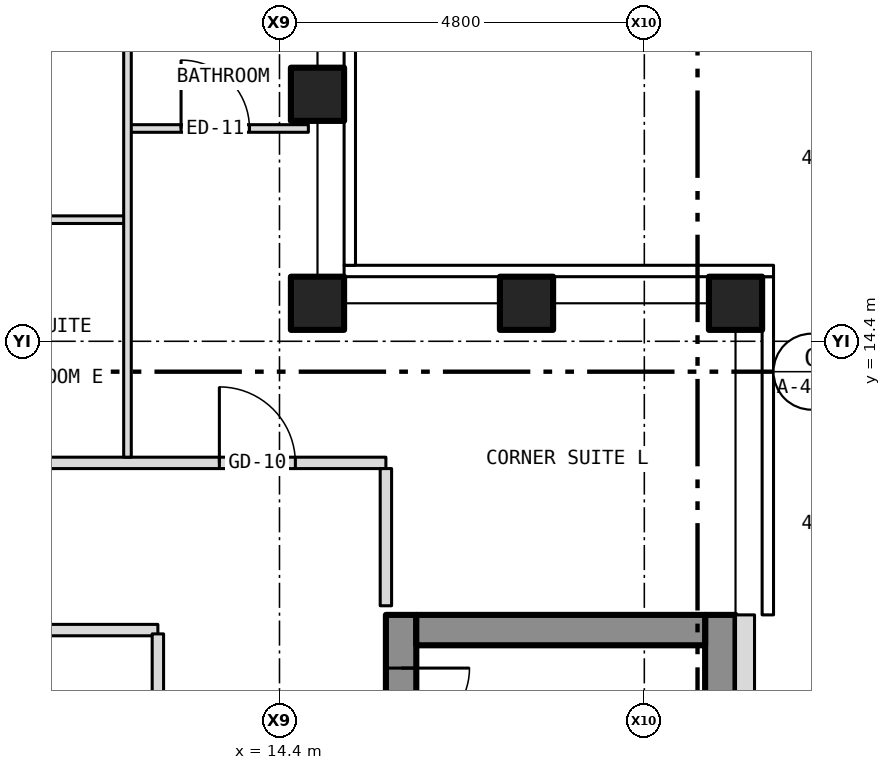
"""IFC4 building model, lengths in metres.
Left out: names, types, materials, properties, quantities, classifications, styles, units other than length and angle.
Written with IfcOpenShell. Run it as: python <this file> out.ifc"""

import sys

from ifc_helpers import new_model, si_unit, direction, frame, frame_2d, origin, origin_2d, place, context, subcontext, project, spatial, rectangle, hollow_rectangle, extrude, element, fill, save


model = new_model("IFC4")
c1 = context("Model", 3, precision=1e-05, world=origin(), true_north=direction((0.0, 1.0)))
c2 = subcontext(c1, "Body", "Model", "MODEL_VIEW")
j1 = project(units=[si_unit("LENGTHUNIT", "METRE"), si_unit("PLANEANGLEUNIT", "RADIAN")], contexts=[c1])
p1 = place(None, origin())
s1 = spatial("IfcSite", under=j1, at=p1, CompositionType="ELEMENT")
p2 = place(p1, origin())
s2 = spatial("IfcBuilding", under=s1, at=p2, CompositionType="ELEMENT")
p3 = place(p2, frame((0.0, 0.0, 212.0)))
s3 = spatial("IfcBuildingStorey", under=s2, at=p3, CompositionType="ELEMENT", Elevation=212.0)
for number, where, z_axis, x_axis in (
    (1, (20.4, 14.9, -0.15), (0.0, 0.0, 1.0), (1.0, 0.0, 0.0)),
    (2, (14.9, 14.9, -0.15), (0.0, 0.0, 1.0), (1.0, 0.0, 0.0)),
    (3, (14.9, 17.65, -0.15), (0.0, 0.0, 1.0), (1.0, 0.0, 0.0)),
    (4, (17.65, 14.9, -0.15), (0.0, 0.0, 1.0), (1.0, 0.0, 0.0)),
):
    element("IfcColumn", number, at=place(p3, frame(where, z_axis=z_axis, x_axis=x_axis)), inside=s3, PredefinedType="COLUMN", context=c2, shape_type="SweptSolid", body=[
        extrude(hollow_rectangle(XDim=0.7, YDim=0.7, WallThickness=0.04, at=origin_2d()), origin(), (0.0, 0.0, 1.0), 3.5),
    ])
p4 = place(p3, frame((16.0, -10.8, 0.0), z_axis=(0.0, 0.0, 1.0), x_axis=(0.0, 1.0, 0.0)))
e5 = element("IfcWall", 5, at=p4, inside=s3, PredefinedType="SHEAR", context=c2, shape_type="SweptSolid", body=[
    extrude(rectangle(XDim=21.6, YDim=0.4, at=frame_2d((10.8, 0.0))), origin(), (0.0, 0.0, 1.0), 3.25),
])
p5 = place(p4, frame((9.4, 0.0, 0.0)))
e6 = element("IfcOpeningElement", 6, at=p5, cuts=e5, PredefinedType="OPENING", context=c2, shape_type="SweptSolid", body=[
    extrude(rectangle(XDim=1.1, YDim=2.1, at=frame_2d((0.55, 1.05))), frame((0.0, 0.212, 0.0), z_axis=(0.0, -1.0, 0.0), x_axis=(1.0, 0.0, 0.0)), (0.0, 0.0, 1.0), 0.424),
])
p6 = place(p4, frame((11.5, 0.0, 0.0)))
e7 = element("IfcOpeningElement", 7, at=p6, cuts=e5, PredefinedType="OPENING", context=c2, shape_type="SweptSolid", body=[
    extrude(rectangle(XDim=1.1, YDim=2.1, at=frame_2d((0.55, 1.05))), frame((0.0, 0.212, 0.0), z_axis=(0.0, -1.0, 0.0), x_axis=(1.0, 0.0, 0.0)), (0.0, 0.0, 1.0), 0.424),
])
p7 = place(p4, frame((13.6, 0.0, 0.0)))
e8 = element("IfcOpeningElement", 8, at=p7, cuts=e5, PredefinedType="OPENING", context=c2, shape_type="SweptSolid", body=[
    extrude(rectangle(XDim=1.1, YDim=2.1, at=frame_2d((0.55, 1.05))), frame((0.0, 0.212, 0.0), z_axis=(0.0, -1.0, 0.0), x_axis=(1.0, 0.0, 0.0)), (0.0, 0.0, 1.0), 0.424),
])
p8 = place(p4, frame((15.7, 0.0, 0.0)))
e9 = element("IfcOpeningElement", 9, at=p8, cuts=e5, PredefinedType="OPENING", context=c2, shape_type="SweptSolid", body=[
    extrude(rectangle(XDim=1.1, YDim=2.1, at=frame_2d((0.55, 1.05))), frame((0.0, 0.212, 0.0), z_axis=(0.0, -1.0, 0.0), x_axis=(1.0, 0.0, 0.0)), (0.0, 0.0, 1.0), 0.424),
])
p9 = place(p4, frame((17.8, 0.0, 0.0)))
e10 = element("IfcOpeningElement", 10, at=p9, cuts=e5, PredefinedType="OPENING", context=c2, shape_type="SweptSolid", body=[
    extrude(rectangle(XDim=1.1, YDim=2.1, at=frame_2d((0.55, 1.05))), frame((0.0, 0.212, 0.0), z_axis=(0.0, -1.0, 0.0), x_axis=(1.0, 0.0, 0.0)), (0.0, 0.0, 1.0), 0.424),
])
p10 = place(p4, frame((5.642, 0.0, 0.0)))
e11 = element("IfcOpeningElement", 11, at=p10, cuts=e5, PredefinedType="OPENING", context=c2, shape_type="SweptSolid", body=[
    extrude(rectangle(XDim=1.1, YDim=2.1, at=frame_2d((0.55, 1.05))), frame((0.0, 0.212, 0.0), z_axis=(0.0, -1.0, 0.0), x_axis=(1.0, 0.0, 0.0)), (0.0, 0.0, 1.0), 0.424),
])
p11 = place(p4, frame((7.5, 0.0, 0.0)))
e12 = element("IfcOpeningElement", 12, at=p11, cuts=e5, PredefinedType="OPENING", context=c2, shape_type="SweptSolid", body=[
    extrude(rectangle(XDim=1.1, YDim=2.1, at=frame_2d((0.55, 1.05))), frame((0.0, 0.212, 0.0), z_axis=(0.0, -1.0, 0.0), x_axis=(1.0, 0.0, 0.0)), (0.0, 0.0, 1.0), 0.424),
])
p12 = place(p4, frame((20.0, 0.0, 0.0)))
e13 = element("IfcOpeningElement", 13, at=p12, cuts=e5, PredefinedType="OPENING", context=c2, shape_type="SweptSolid", body=[
    extrude(rectangle(XDim=0.9, YDim=2.1, at=frame_2d((0.45, 1.05))), frame((0.0, 0.212, 0.0), z_axis=(0.0, -1.0, 0.0), x_axis=(1.0, 0.0, 0.0)), (0.0, 0.0, 1.0), 0.424),
])
p13 = place(p3, frame((20.2, -10.8, 0.0), z_axis=(0.0, 0.0, 1.0), x_axis=(0.0, 1.0, 0.0)))
e14 = element("IfcWall", 14, at=p13, inside=s3, PredefinedType="SHEAR", context=c2, shape_type="SweptSolid", body=[
    extrude(rectangle(XDim=21.6, YDim=0.4, at=frame_2d((10.8, 0.0))), origin(), (0.0, 0.0, 1.0), 3.25),
])
p14 = place(p3, frame((16.2, 10.6, 0.0), z_axis=(0.0, 0.0, 1.0), x_axis=(1.0, 0.0, 0.0)))
e15 = element("IfcWall", 15, at=p14, inside=s3, PredefinedType="SHEAR", context=c2, shape_type="SweptSolid", body=[
    extrude(rectangle(XDim=3.8, YDim=0.4, at=frame_2d((1.9, 0.0))), origin(), (0.0, 0.0, 1.0), 3.25),
])
p15 = place(p3, frame((20.525, -10.8, 0.0), z_axis=(0.0, 0.0, 1.0), x_axis=(0.0, 1.0, 0.0)))
e16 = element("IfcWall", 16, at=p15, inside=s3, PredefinedType="SOLIDWALL", context=c2, shape_type="SweptSolid", body=[
    extrude(rectangle(XDim=21.6, YDim=0.25, at=frame_2d((10.8, 0.0))), origin(), (0.0, 0.0, 1.0), 3.5),
])
p16 = place(p15, frame((2.95, 0.0, 1.0)))
e17 = element("IfcOpeningElement", 17, at=p16, cuts=e16, PredefinedType="OPENING", context=c2, shape_type="SweptSolid", body=[
    extrude(rectangle(XDim=0.6, YDim=1.5, at=frame_2d((0.3, 0.75))), frame((0.0, 0.137, 0.0), z_axis=(0.0, -1.0, 0.0), x_axis=(1.0, 0.0, 0.0)), (0.0, 0.0, 1.0), 0.274),
])
p17 = place(p3, frame((3.3, 10.6, 0.0), z_axis=(0.0, 0.0, 1.0), x_axis=(1.0, 0.0, 0.0)))
e18 = element("IfcWall", 18, at=p17, inside=s3, PredefinedType="PARTITIONING", context=c2, shape_type="SweptSolid", body=[
    extrude(rectangle(XDim=9.5, YDim=0.15, at=frame_2d((4.75, 0.0))), origin(), (0.0, 0.0, 1.0), 3.35),
])
p18 = place(p17, frame((1.925, 0.0, 0.0)))
e19 = element("IfcOpeningElement", 19, at=p18, cuts=e18, PredefinedType="OPENING", context=c2, shape_type="SweptSolid", body=[
    extrude(rectangle(XDim=0.9, YDim=2.1, at=frame_2d((0.45, 1.05))), frame((0.0, 0.087, 0.0), z_axis=(0.0, -1.0, 0.0), x_axis=(1.0, 0.0, 0.0)), (0.0, 0.0, 1.0), 0.174),
])
p19 = place(p3, frame((-15.8, 12.8, 0.0), z_axis=(0.0, 0.0, 1.0), x_axis=(1.0, 0.0, 0.0)))
e20 = element("IfcWall", 20, at=p19, inside=s3, PredefinedType="PARTITIONING", context=c2, shape_type="SweptSolid", body=[
    extrude(rectangle(XDim=31.6, YDim=0.15, at=frame_2d((15.8, 0.0))), origin(), (0.0, 0.0, 1.0), 3.35),
])
p20 = place(p19, frame((5.417, 0.0, 0.0)))
e21 = element("IfcOpeningElement", 21, at=p20, cuts=e20, PredefinedType="OPENING", context=c2, shape_type="SweptSolid", body=[
    extrude(rectangle(XDim=0.9, YDim=2.1, at=frame_2d((0.45, 1.05))), frame((0.0, 0.087, 0.0), z_axis=(0.0, -1.0, 0.0), x_axis=(1.0, 0.0, 0.0)), (0.0, 0.0, 1.0), 0.174),
])
p21 = place(p19, frame((10.384, 0.0, 0.0)))
e22 = element("IfcOpeningElement", 22, at=p21, cuts=e20, PredefinedType="OPENING", context=c2, shape_type="SweptSolid", body=[
    extrude(rectangle(XDim=0.9, YDim=2.1, at=frame_2d((0.45, 1.05))), frame((0.0, 0.087, 0.0), z_axis=(0.0, -1.0, 0.0), x_axis=(1.0, 0.0, 0.0)), (0.0, 0.0, 1.0), 0.174),
])
p22 = place(p19, frame((14.2, 0.0, 0.0)))
e23 = element("IfcOpeningElement", 23, at=p22, cuts=e20, PredefinedType="OPENING", context=c2, shape_type="SweptSolid", body=[
    extrude(rectangle(XDim=1.0, YDim=2.1, at=frame_2d((0.5, 1.05))), frame((0.0, 0.087, 0.0), z_axis=(0.0, -1.0, 0.0), x_axis=(1.0, 0.0, 0.0)), (0.0, 0.0, 1.0), 0.174),
])
p23 = place(p19, frame((19.166, 0.0, 0.0)))
e24 = element("IfcOpeningElement", 24, at=p23, cuts=e20, PredefinedType="OPENING", context=c2, shape_type="SweptSolid", body=[
    extrude(rectangle(XDim=1.0, YDim=2.1, at=frame_2d((0.5, 1.05))), frame((0.0, 0.087, 0.0), z_axis=(0.0, -1.0, 0.0), x_axis=(1.0, 0.0, 0.0)), (0.0, 0.0, 1.0), 0.174),
])
p24 = place(p19, frame((24.134, 0.0, 0.0)))
e25 = element("IfcOpeningElement", 25, at=p24, cuts=e20, PredefinedType="OPENING", context=c2, shape_type="SweptSolid", body=[
    extrude(rectangle(XDim=1.0, YDim=2.1, at=frame_2d((0.5, 1.05))), frame((0.0, 0.087, 0.0), z_axis=(0.0, -1.0, 0.0), x_axis=(1.0, 0.0, 0.0)), (0.0, 0.0, 1.0), 0.174),
])
p25 = place(p19, frame((1.192, 0.0, 0.0)))
e26 = element("IfcOpeningElement", 26, at=p25, cuts=e20, PredefinedType="OPENING", context=c2, shape_type="SweptSolid", body=[
    extrude(rectangle(XDim=1.0, YDim=2.1, at=frame_2d((0.5, 1.05))), frame((0.0, 0.087, 0.0), z_axis=(0.0, -1.0, 0.0), x_axis=(1.0, 0.0, 0.0)), (0.0, 0.0, 1.0), 0.174),
])
p26 = place(p19, frame((29.409, 0.0, 0.0)))
e27 = element("IfcOpeningElement", 27, at=p26, cuts=e20, PredefinedType="OPENING", context=c2, shape_type="SweptSolid", body=[
    extrude(rectangle(XDim=1.0, YDim=2.1, at=frame_2d((0.5, 1.05))), frame((0.0, 0.087, 0.0), z_axis=(0.0, -1.0, 0.0), x_axis=(1.0, 0.0, 0.0)), (0.0, 0.0, 1.0), 0.174),
])
p27 = place(p3, frame((10.2, 16.0, 0.0), z_axis=(0.0, 0.0, 1.0), x_axis=(1.0, 0.0, 0.0)))
e28 = element("IfcWall", 28, at=p27, inside=s3, PredefinedType="PARTITIONING", context=c2, shape_type="SweptSolid", body=[
    extrude(rectangle(XDim=2.2, YDim=0.1, at=frame_2d((1.1, 0.0))), origin(), (0.0, 0.0, 1.0), 3.35),
])
p28 = place(p3, frame((12.4, 17.2, 0.0), z_axis=(0.0, 0.0, 1.0), x_axis=(1.0, 0.0, 0.0)))
e29 = element("IfcWall", 29, at=p28, inside=s3, PredefinedType="PARTITIONING", context=c2, shape_type="SweptSolid", body=[
    extrude(rectangle(XDim=2.38, YDim=0.1, at=frame_2d((1.19, 0.0))), origin(), (0.0, 0.0, 1.0), 3.35),
])
p29 = place(p28, frame((0.705, 0.0, 0.0)))
e30 = element("IfcOpeningElement", 30, at=p29, cuts=e29, PredefinedType="OPENING", context=c2, shape_type="SweptSolid", body=[
    extrude(rectangle(XDim=0.9, YDim=2.1, at=frame_2d((0.45, 1.05))), frame((0.0, 0.062, 0.0), z_axis=(0.0, -1.0, 0.0), x_axis=(1.0, 0.0, 0.0)), (0.0, 0.0, 1.0), 0.124),
])
p30 = place(p3, frame((12.4, 12.875, 0.0), z_axis=(0.0, 0.0, 1.0), x_axis=(0.0, 1.0, 0.0)))
e31 = element("IfcWall", 31, at=p30, inside=s3, PredefinedType="PARTITIONING", context=c2, shape_type="SweptSolid", body=[
    extrude(rectangle(XDim=7.905, YDim=0.1, at=frame_2d((3.953, 0.0))), origin(), (0.0, 0.0, 1.0), 3.35),
])
p31 = place(p3, frame((12.8, 8.175, 0.0), z_axis=(0.0, 0.0, 1.0), x_axis=(0.0, 1.0, 0.0)))
e32 = element("IfcWall", 32, at=p31, inside=s3, PredefinedType="PARTITIONING", context=c2, shape_type="SweptSolid", body=[
    extrude(rectangle(XDim=2.375, YDim=0.15, at=frame_2d((1.188, 0.0))), origin(), (0.0, 0.0, 1.0), 3.35),
])
p32 = place(p3, frame((15.8, 10.92, 0.0), z_axis=(0.0, 0.0, 1.0), x_axis=(0.0, 1.0, 0.0)))
e33 = element("IfcWall", 33, at=p32, inside=s3, PredefinedType="PARTITIONING", context=c2, shape_type="SweptSolid", body=[
    extrude(rectangle(XDim=1.805, YDim=0.15, at=frame_2d((0.903, 0.0))), origin(), (0.0, 0.0, 1.0), 3.35),
])
p33 = place(p12, origin())
e34 = element("IfcDoor", 34, at=p33, inside=s3, OperationType="SINGLE_SWING_RIGHT", PredefinedType="DOOR", context=c2, shape_type="SweptSolid", body=[
    extrude(rectangle(XDim=0.9, YDim=2.1, at=frame_2d((0.45, 1.05))), frame((0.0, 0.025, 0.0), z_axis=(0.0, -1.0, 0.0), x_axis=(1.0, 0.0, 0.0)), (0.0, 0.0, 1.0), 0.05),
])
fill(e13, e34)
p34 = place(p29, origin())
e35 = element("IfcDoor", 35, at=p34, inside=s3, OperationType="SINGLE_SWING_LEFT", PredefinedType="DOOR", context=c2, shape_type="SweptSolid", body=[
    extrude(rectangle(XDim=0.9, YDim=2.1, at=frame_2d((0.45, 1.05))), frame((0.0, 0.025, 0.0), z_axis=(0.0, -1.0, 0.0), x_axis=(1.0, 0.0, 0.0)), (0.0, 0.0, 1.0), 0.05),
])
fill(e30, e35)
p35 = place(p26, origin())
e36 = element("IfcDoor", 36, at=p35, inside=s3, OperationType="SINGLE_SWING_LEFT", PredefinedType="DOOR", context=c2, shape_type="SweptSolid", body=[
    extrude(rectangle(XDim=1.0, YDim=2.1, at=frame_2d((0.5, 1.05))), frame((0.0, 0.025, 0.0), z_axis=(0.0, -1.0, 0.0), x_axis=(1.0, 0.0, 0.0)), (0.0, 0.0, 1.0), 0.05),
])
fill(e27, e36)
save(model, sys.argv[1])
